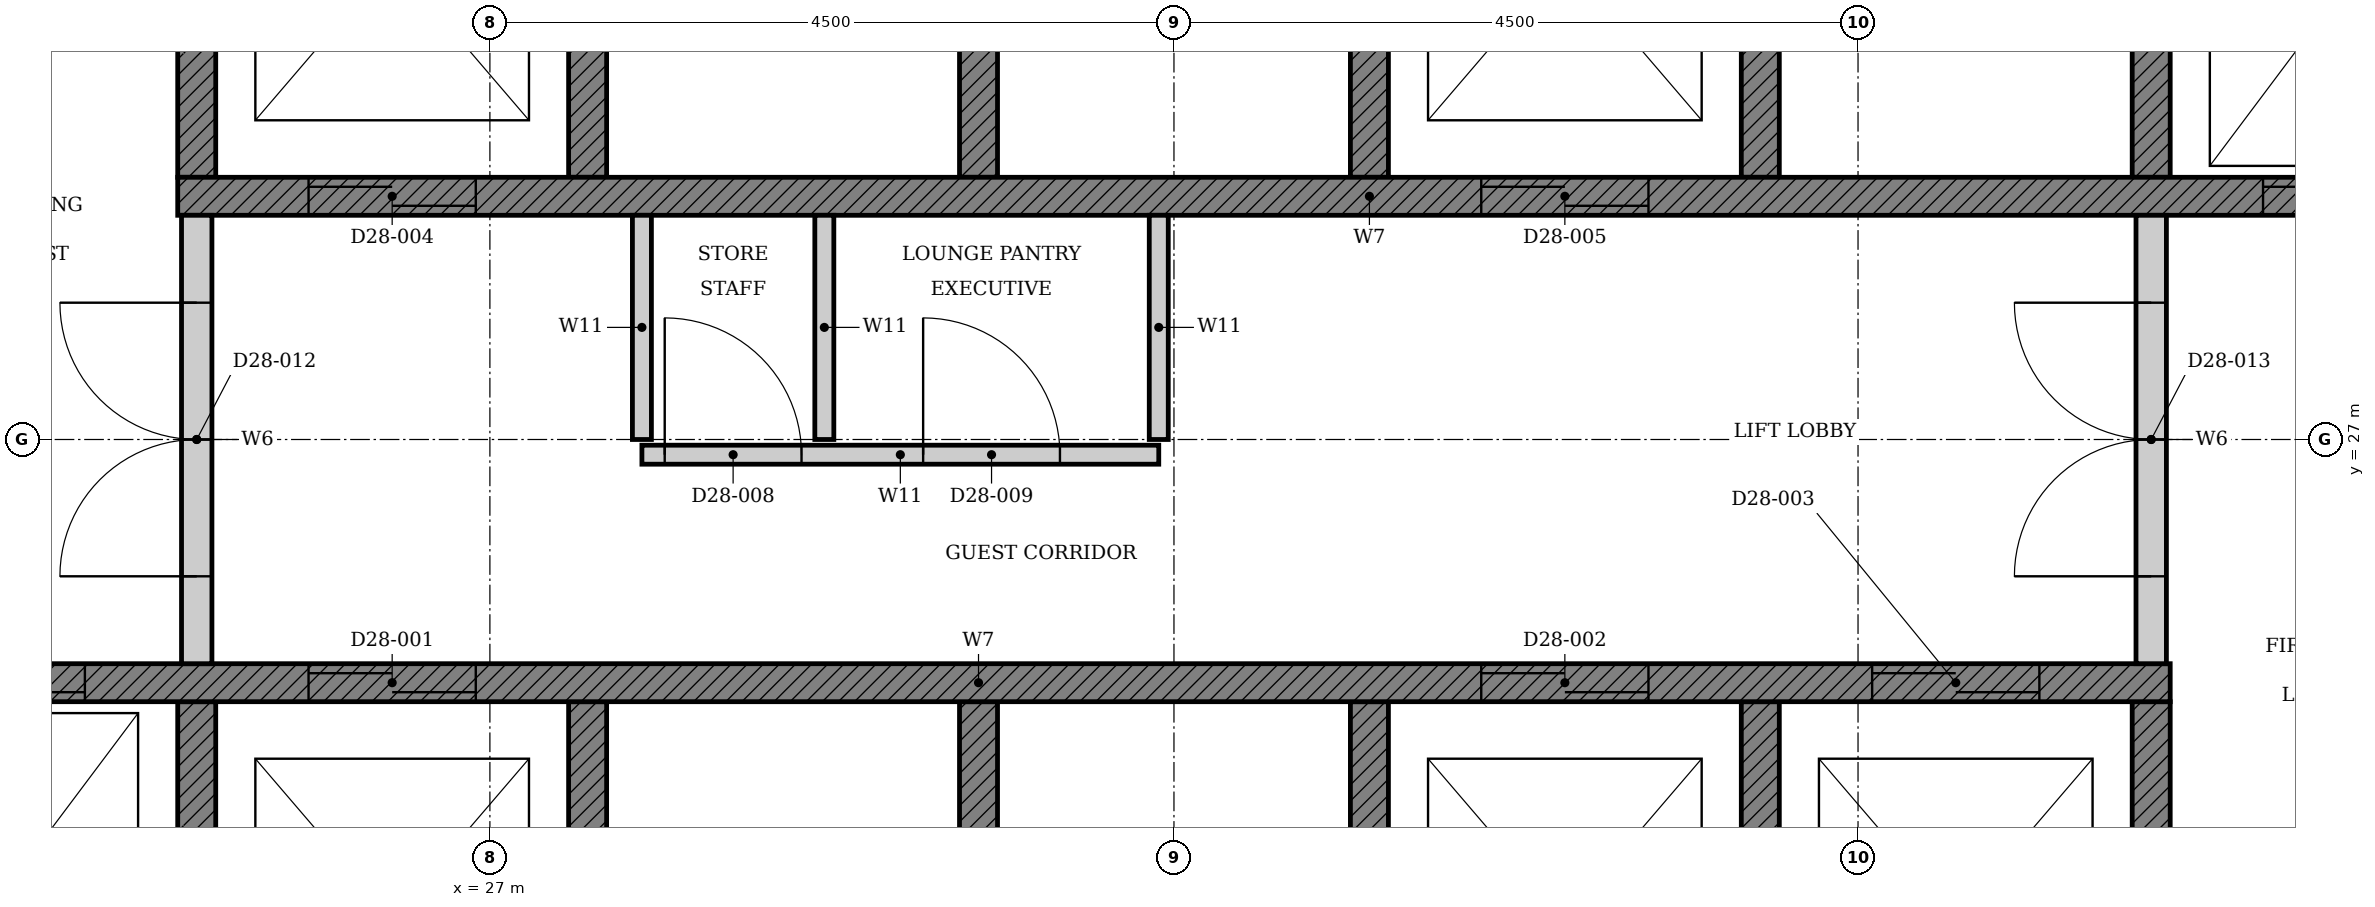
"""IFC4 building model, lengths in metres.
Left out: names, types, materials, properties, quantities, classifications, styles, units other than length and angle.
Written with IfcOpenShell. Run it as: python <this file> out.ifc"""

import sys

from ifc_helpers import new_model, si_unit, direction, frame, frame_2d, origin, place, context, subcontext, project, spatial, polyline, rectangle, outline, extrude, element, fill, save


model = new_model("IFC4")
c1 = context("Model", 3, precision=1e-05, world=origin(), true_north=direction((0.0, 1.0)))
c2 = subcontext(c1, "Body", "Model", "MODEL_VIEW")
j1 = project(units=[si_unit("LENGTHUNIT", "METRE"), si_unit("PLANEANGLEUNIT", "RADIAN")], contexts=[c1])
p1 = place(None, origin())
s1 = spatial("IfcSite", under=j1, at=p1, CompositionType="ELEMENT")
p2 = place(p1, origin())
s2 = spatial("IfcBuilding", under=s1, at=p2, CompositionType="ELEMENT")
p3 = place(p2, frame((0.0, 0.0, 115.2)))
s3 = spatial("IfcBuildingStorey", under=s2, at=p3, CompositionType="ELEMENT", Elevation=115.2)
p4 = place(p3, origin())
e1 = element("IfcWall", 1, at=p4, inside=s3, PredefinedType="SHEAR", context=c2, shape_type="SweptSolid", body=[
    extrude(outline(polyline([(22.375, 22.35), (38.053, 22.35), (38.053, 25.275), (37.803, 25.275), (37.803, 22.65), (35.482, 22.65), (35.482, 25.275), (35.232, 25.275), (35.232, 22.65), (32.911, 22.65), (32.911, 25.275), (32.661, 25.275), (32.661, 22.65), (30.339, 22.65), (30.339, 25.275), (30.089, 25.275), (30.089, 22.65), (27.768, 22.65), (27.768, 25.275), (27.518, 25.275), (27.518, 22.65), (25.197, 22.65), (25.197, 25.275), (24.947, 25.275), (24.947, 22.65), (22.625, 22.65), (22.625, 25.275), (22.375, 25.275), (22.375, 22.35)])), origin(), (0.0, 0.0, 1.0), 3.3),
])
p5 = place(p3, origin())
e2 = element("IfcWall", 2, at=p5, inside=s3, PredefinedType="SHEAR", context=c2, shape_type="SweptSolid", body=[
    extrude(outline(polyline([(24.947, 28.725), (25.197, 28.725), (25.197, 31.35), (27.518, 31.35), (27.518, 28.725), (27.768, 28.725), (27.768, 31.35), (30.089, 31.35), (30.089, 28.725), (30.339, 28.725), (30.339, 31.35), (32.661, 31.35), (32.661, 28.725), (32.911, 28.725), (32.911, 31.35), (35.232, 31.35), (35.232, 28.725), (35.482, 28.725), (35.482, 31.35), (37.803, 31.35), (37.803, 28.725), (38.053, 28.725), (38.053, 31.35), (40.375, 31.35), (40.375, 28.725), (40.625, 28.725), (40.625, 31.65), (24.947, 31.65), (24.947, 28.725)])), origin(), (0.0, 0.0, 1.0), 3.3),
])
p6 = place(p3, frame((22.375, 25.4, 0.0), z_axis=(0.0, 0.0, 1.0), x_axis=(1.0, 0.0, 0.0)))
e3 = element("IfcWall", 3, at=p6, inside=s3, PredefinedType="SHEAR", context=c2, shape_type="SweptSolid", body=[
    extrude(rectangle(XDim=15.678, YDim=0.25, at=frame_2d((7.839, 0.0))), origin(), (0.0, 0.0, 1.0), 3.3),
])
p7 = place(p6, frame((3.432, 0.0, 0.0)))
e4 = element("IfcOpeningElement", 4, at=p7, cuts=e3, PredefinedType="OPENING", context=c2, shape_type="SweptSolid", body=[
    extrude(rectangle(XDim=1.1, YDim=2.1, at=frame_2d((0.55, 1.05))), frame((0.0, 0.135, 0.0), z_axis=(0.0, -1.0, 0.0), x_axis=(1.0, 0.0, 0.0)), (0.0, 0.0, 1.0), 0.27),
])
p8 = place(p6, frame((11.146, 0.0, 0.0)))
e5 = element("IfcOpeningElement", 5, at=p8, cuts=e3, PredefinedType="OPENING", context=c2, shape_type="SweptSolid", body=[
    extrude(rectangle(XDim=1.1, YDim=2.1, at=frame_2d((0.55, 1.05))), frame((0.0, 0.135, 0.0), z_axis=(0.0, -1.0, 0.0), x_axis=(1.0, 0.0, 0.0)), (0.0, 0.0, 1.0), 0.27),
])
p9 = place(p6, frame((13.718, 0.0, 0.0)))
e6 = element("IfcOpeningElement", 6, at=p9, cuts=e3, PredefinedType="OPENING", context=c2, shape_type="SweptSolid", body=[
    extrude(rectangle(XDim=1.1, YDim=2.1, at=frame_2d((0.55, 1.05))), frame((0.0, 0.135, 0.0), z_axis=(0.0, -1.0, 0.0), x_axis=(1.0, 0.0, 0.0)), (0.0, 0.0, 1.0), 0.27),
])
p10 = place(p6, frame((0.861, 0.0, 0.0)))
e7 = element("IfcOpeningElement", 7, at=p10, cuts=e3, PredefinedType="OPENING", context=c2, shape_type="SweptSolid", body=[
    extrude(rectangle(XDim=1.1, YDim=2.1, at=frame_2d((0.55, 1.05))), frame((0.0, 0.135, 0.0), z_axis=(0.0, -1.0, 0.0), x_axis=(1.0, 0.0, 0.0)), (0.0, 0.0, 1.0), 0.27),
])
p11 = place(p3, frame((24.947, 28.6, 0.0), z_axis=(0.0, 0.0, 1.0), x_axis=(1.0, 0.0, 0.0)))
e8 = element("IfcWall", 8, at=p11, inside=s3, PredefinedType="SHEAR", context=c2, shape_type="SweptSolid", body=[
    extrude(rectangle(XDim=15.678, YDim=0.25, at=frame_2d((7.839, 0.0))), origin(), (0.0, 0.0, 1.0), 3.3),
])
p12 = place(p11, frame((0.861, 0.0, 0.0)))
e9 = element("IfcOpeningElement", 9, at=p12, cuts=e8, PredefinedType="OPENING", context=c2, shape_type="SweptSolid", body=[
    extrude(rectangle(XDim=1.1, YDim=2.1, at=frame_2d((0.55, 1.05))), frame((0.0, 0.135, 0.0), z_axis=(0.0, -1.0, 0.0), x_axis=(1.0, 0.0, 0.0)), (0.0, 0.0, 1.0), 0.27),
])
p13 = place(p11, frame((8.575, 0.0, 0.0)))
e10 = element("IfcOpeningElement", 10, at=p13, cuts=e8, PredefinedType="OPENING", context=c2, shape_type="SweptSolid", body=[
    extrude(rectangle(XDim=1.1, YDim=2.1, at=frame_2d((0.55, 1.05))), frame((0.0, 0.135, 0.0), z_axis=(0.0, -1.0, 0.0), x_axis=(1.0, 0.0, 0.0)), (0.0, 0.0, 1.0), 0.27),
])
p14 = place(p11, frame((13.718, 0.0, 0.0)))
e11 = element("IfcOpeningElement", 11, at=p14, cuts=e8, PredefinedType="OPENING", context=c2, shape_type="SweptSolid", body=[
    extrude(rectangle(XDim=1.1, YDim=2.1, at=frame_2d((0.55, 1.05))), frame((0.0, 0.135, 0.0), z_axis=(0.0, -1.0, 0.0), x_axis=(1.0, 0.0, 0.0)), (0.0, 0.0, 1.0), 0.27),
])
p15 = place(p3, frame((28.0, 26.9, 0.0), z_axis=(0.0, 0.0, 1.0), x_axis=(1.0, 0.0, 0.0)))
e12 = element("IfcWall", 12, at=p15, inside=s3, PredefinedType="PARTITIONING", context=c2, shape_type="SweptSolid", body=[
    extrude(rectangle(XDim=3.4, YDim=0.125, at=frame_2d((1.7, 0.0))), origin(), (0.0, 0.0, 1.0), 3.3),
])
p16 = place(p15, frame((0.15, 0.0, 0.0)))
e13 = element("IfcOpeningElement", 13, at=p16, cuts=e12, PredefinedType="OPENING", context=c2, shape_type="SweptSolid", body=[
    extrude(rectangle(XDim=0.9, YDim=2.1, at=frame_2d((0.45, 1.05))), frame((0.0, 0.073, 0.0), z_axis=(0.0, -1.0, 0.0), x_axis=(1.0, 0.0, 0.0)), (0.0, 0.0, 1.0), 0.145),
])
p17 = place(p15, frame((1.85, 0.0, 0.0)))
e14 = element("IfcOpeningElement", 14, at=p17, cuts=e12, PredefinedType="OPENING", context=c2, shape_type="SweptSolid", body=[
    extrude(rectangle(XDim=0.9, YDim=2.1, at=frame_2d((0.45, 1.05))), frame((0.0, 0.073, 0.0), z_axis=(0.0, -1.0, 0.0), x_axis=(1.0, 0.0, 0.0)), (0.0, 0.0, 1.0), 0.145),
])
for number, where, z_axis, x_axis in (
    (15, (28.0, 28.475, 0.0), (0.0, 0.0, 1.0), (0.0, -1.0, 0.0)),
    (16, (29.2, 28.475, 0.0), (0.0, 0.0, 1.0), (0.0, -1.0, 0.0)),
    (17, (31.4, 28.475, 0.0), (0.0, 0.0, 1.0), (0.0, -1.0, 0.0)),
):
    element("IfcWall", number, at=place(p3, frame(where, z_axis=z_axis, x_axis=x_axis)), inside=s3, PredefinedType="PARTITIONING", context=c2, shape_type="SweptSolid", body=[
        extrude(rectangle(XDim=1.475, YDim=0.125, at=frame_2d((0.738, 0.0))), origin(), (0.0, 0.0, 1.0), 3.3),
    ])
p18 = place(p3, frame((25.072, 25.525, 0.0), z_axis=(0.0, 0.0, 1.0), x_axis=(0.0, 1.0, 0.0)))
e18 = element("IfcWall", 18, at=p18, inside=s3, PredefinedType="PARTITIONING", context=c2, shape_type="SweptSolid", body=[
    extrude(rectangle(XDim=2.95, YDim=0.2, at=frame_2d((1.475, 0.0))), origin(), (0.0, 0.0, 1.0), 3.3),
])
p19 = place(p18, frame((0.575, 0.0, 0.0)))
e19 = element("IfcOpeningElement", 19, at=p19, cuts=e18, PredefinedType="OPENING", context=c2, shape_type="SweptSolid", body=[
    extrude(rectangle(XDim=1.8, YDim=2.1, at=frame_2d((0.9, 1.05))), frame((0.0, 0.11, 0.0), z_axis=(0.0, -1.0, 0.0), x_axis=(1.0, 0.0, 0.0)), (0.0, 0.0, 1.0), 0.22),
])
p20 = place(p3, frame((37.928, 25.525, 0.0), z_axis=(0.0, 0.0, 1.0), x_axis=(0.0, 1.0, 0.0)))
e20 = element("IfcWall", 20, at=p20, inside=s3, PredefinedType="PARTITIONING", context=c2, shape_type="SweptSolid", body=[
    extrude(rectangle(XDim=2.95, YDim=0.2, at=frame_2d((1.475, 0.0))), origin(), (0.0, 0.0, 1.0), 3.3),
])
p21 = place(p20, frame((0.575, 0.0, 0.0)))
e21 = element("IfcOpeningElement", 21, at=p21, cuts=e20, PredefinedType="OPENING", context=c2, shape_type="SweptSolid", body=[
    extrude(rectangle(XDim=1.8, YDim=2.1, at=frame_2d((0.9, 1.05))), frame((0.0, 0.11, 0.0), z_axis=(0.0, -1.0, 0.0), x_axis=(1.0, 0.0, 0.0)), (0.0, 0.0, 1.0), 0.22),
])
p22 = place(p7, origin())
e22 = element("IfcDoor", 22, at=p22, inside=s3, OperationType="DOUBLE_DOOR_SLIDING", PredefinedType="DOOR", context=c2, shape_type="SweptSolid", body=[
    extrude(rectangle(XDim=1.1, YDim=2.1, at=frame_2d((0.55, 1.05))), frame((0.0, 0.025, 0.0), z_axis=(0.0, -1.0, 0.0), x_axis=(1.0, 0.0, 0.0)), (0.0, 0.0, 1.0), 0.05),
])
fill(e4, e22)
p23 = place(p8, origin())
e23 = element("IfcDoor", 23, at=p23, inside=s3, OperationType="DOUBLE_DOOR_SLIDING", PredefinedType="DOOR", context=c2, shape_type="SweptSolid", body=[
    extrude(rectangle(XDim=1.1, YDim=2.1, at=frame_2d((0.55, 1.05))), frame((0.0, 0.025, 0.0), z_axis=(0.0, -1.0, 0.0), x_axis=(1.0, 0.0, 0.0)), (0.0, 0.0, 1.0), 0.05),
])
fill(e5, e23)
p24 = place(p9, origin())
e24 = element("IfcDoor", 24, at=p24, inside=s3, OperationType="DOUBLE_DOOR_SLIDING", PredefinedType="DOOR", context=c2, shape_type="SweptSolid", body=[
    extrude(rectangle(XDim=1.1, YDim=2.1, at=frame_2d((0.55, 1.05))), frame((0.0, 0.025, 0.0), z_axis=(0.0, -1.0, 0.0), x_axis=(1.0, 0.0, 0.0)), (0.0, 0.0, 1.0), 0.05),
])
fill(e6, e24)
p25 = place(p12, origin())
e25 = element("IfcDoor", 25, at=p25, inside=s3, OperationType="DOUBLE_DOOR_SLIDING", PredefinedType="DOOR", context=c2, shape_type="SweptSolid", body=[
    extrude(rectangle(XDim=1.1, YDim=2.1, at=frame_2d((0.55, 1.05))), frame((0.0, 0.025, 0.0), z_axis=(0.0, -1.0, 0.0), x_axis=(1.0, 0.0, 0.0)), (0.0, 0.0, 1.0), 0.05),
])
fill(e9, e25)
p26 = place(p13, origin())
e26 = element("IfcDoor", 26, at=p26, inside=s3, OperationType="DOUBLE_DOOR_SLIDING", PredefinedType="DOOR", context=c2, shape_type="SweptSolid", body=[
    extrude(rectangle(XDim=1.1, YDim=2.1, at=frame_2d((0.55, 1.05))), frame((0.0, 0.025, 0.0), z_axis=(0.0, -1.0, 0.0), x_axis=(1.0, 0.0, 0.0)), (0.0, 0.0, 1.0), 0.05),
])
fill(e10, e26)
p27 = place(p10, origin())
e27 = element("IfcDoor", 27, at=p27, inside=s3, OperationType="DOUBLE_DOOR_SLIDING", PredefinedType="DOOR", context=c2, shape_type="SweptSolid", body=[
    extrude(rectangle(XDim=1.1, YDim=2.1, at=frame_2d((0.55, 1.05))), frame((0.0, 0.025, 0.0), z_axis=(0.0, -1.0, 0.0), x_axis=(1.0, 0.0, 0.0)), (0.0, 0.0, 1.0), 0.05),
])
fill(e7, e27)
p28 = place(p14, origin())
e28 = element("IfcDoor", 28, at=p28, inside=s3, OperationType="DOUBLE_DOOR_SLIDING", PredefinedType="DOOR", context=c2, shape_type="SweptSolid", body=[
    extrude(rectangle(XDim=1.1, YDim=2.1, at=frame_2d((0.55, 1.05))), frame((0.0, 0.025, 0.0), z_axis=(0.0, -1.0, 0.0), x_axis=(1.0, 0.0, 0.0)), (0.0, 0.0, 1.0), 0.05),
])
fill(e11, e28)
p29 = place(p16, origin())
e29 = element("IfcDoor", 29, at=p29, inside=s3, OperationType="SINGLE_SWING_LEFT", PredefinedType="DOOR", context=c2, shape_type="SweptSolid", body=[
    extrude(rectangle(XDim=0.9, YDim=2.1, at=frame_2d((0.45, 1.05))), frame((0.0, 0.025, 0.0), z_axis=(0.0, -1.0, 0.0), x_axis=(1.0, 0.0, 0.0)), (0.0, 0.0, 1.0), 0.05),
])
fill(e13, e29)
p30 = place(p17, origin())
e30 = element("IfcDoor", 30, at=p30, inside=s3, OperationType="SINGLE_SWING_LEFT", PredefinedType="DOOR", context=c2, shape_type="SweptSolid", body=[
    extrude(rectangle(XDim=0.9, YDim=2.1, at=frame_2d((0.45, 1.05))), frame((0.0, 0.025, 0.0), z_axis=(0.0, -1.0, 0.0), x_axis=(1.0, 0.0, 0.0)), (0.0, 0.0, 1.0), 0.05),
])
fill(e14, e30)
p31 = place(p19, origin())
e31 = element("IfcDoor", 31, at=p31, inside=s3, OperationType="DOUBLE_DOOR_SINGLE_SWING", PredefinedType="DOOR", context=c2, shape_type="SweptSolid", body=[
    extrude(rectangle(XDim=1.8, YDim=2.1, at=frame_2d((0.9, 1.05))), frame((0.0, 0.025, 0.0), z_axis=(0.0, -1.0, 0.0), x_axis=(1.0, 0.0, 0.0)), (0.0, 0.0, 1.0), 0.05),
])
fill(e19, e31)
p32 = place(p21, origin())
e32 = element("IfcDoor", 32, at=p32, inside=s3, OperationType="DOUBLE_DOOR_SINGLE_SWING", PredefinedType="DOOR", context=c2, shape_type="SweptSolid", body=[
    extrude(rectangle(XDim=1.8, YDim=2.1, at=frame_2d((0.9, 1.05))), frame((0.0, 0.025, 0.0), z_axis=(0.0, -1.0, 0.0), x_axis=(1.0, 0.0, 0.0)), (0.0, 0.0, 1.0), 0.05),
])
fill(e21, e32)
save(model, sys.argv[1])
